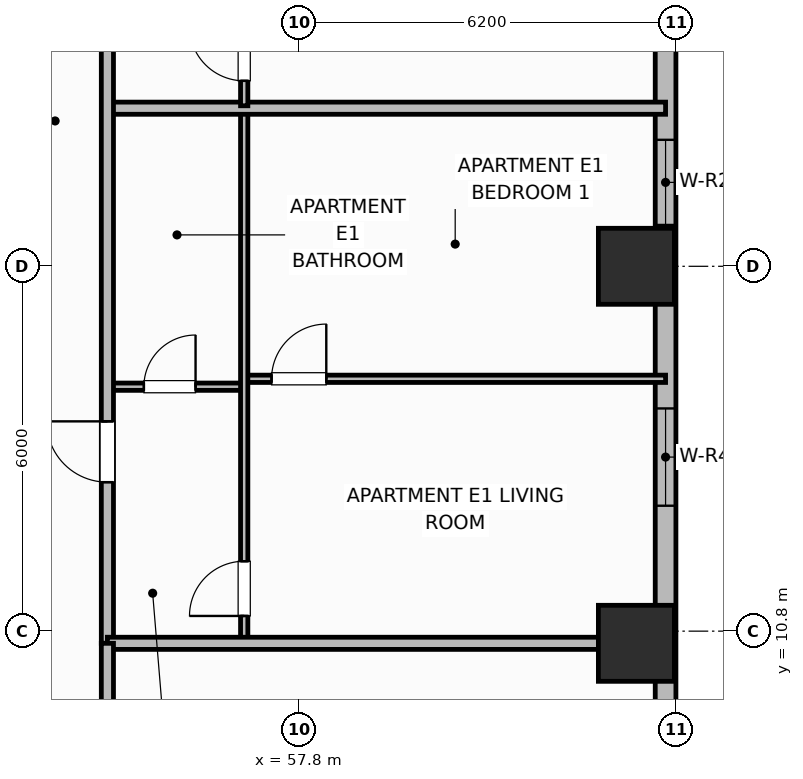
"""IFC4 building model, lengths in metres.
Left out: names, types, materials, properties, quantities, classifications, styles, units other than length and angle.
Written with IfcOpenShell. Run it as: python <this file> out.ifc"""

import sys

from ifc_helpers import new_model, si_unit, direction, frame, frame_2d, origin, origin_2d, place, context, subcontext, project, spatial, rectangle, extrude, element, fill, save


model = new_model("IFC4")
c1 = context("Model", 3, precision=1e-05, world=origin(), true_north=direction((0.0, 1.0)))
c2 = subcontext(c1, "Body", "Model", "MODEL_VIEW")
j1 = project(units=[si_unit("LENGTHUNIT", "METRE"), si_unit("PLANEANGLEUNIT", "RADIAN")], contexts=[c1])
p1 = place(None, origin())
s1 = spatial("IfcSite", under=j1, at=p1, CompositionType="ELEMENT")
p2 = place(p1, origin())
s2 = spatial("IfcBuilding", under=s1, at=p2, CompositionType="ELEMENT")
p3 = place(p2, frame((0.0, 0.0, 62.1)))
s3 = spatial("IfcBuildingStorey", under=s2, at=p3, CompositionType="ELEMENT", Elevation=62.1)
for number, where, z_axis, x_axis in (
    (1, (63.35, 10.6, 0.0), (0.0, 0.0, 1.0), (1.0, 0.0, 0.0)),
    (2, (63.35, 16.8, 0.0), (0.0, 0.0, 1.0), (1.0, 0.0, 0.0)),
):
    element("IfcColumn", number, at=place(p3, frame(where, z_axis=z_axis, x_axis=x_axis)), inside=s3, PredefinedType="COLUMN", context=c2, shape_type="SweptSolid", body=[
        extrude(rectangle(XDim=1.25, YDim=1.25, at=origin_2d()), origin(), (0.0, 0.0, 1.0), 3.7),
    ])
p4 = place(p3, frame((63.83, 9.0, 0.0), z_axis=(0.0, 0.0, 1.0), x_axis=(0.0, 1.0, 0.0)))
e3 = element("IfcWall", 3, at=p4, inside=s3, PredefinedType="SOLIDWALL", context=c2, shape_type="SweptSolid", body=[
    extrude(rectangle(XDim=14.8, YDim=0.34, at=frame_2d((7.4, 0.0))), origin(), (0.0, 0.0, 1.0), 2.7),
])
p5 = place(p4, frame((3.863, 0.0, 0.68)))
e4 = element("IfcOpeningElement", 4, at=p5, cuts=e3, PredefinedType="OPENING", context=c2, shape_type="SweptSolid", body=[
    extrude(rectangle(XDim=1.6, YDim=1.9, at=frame_2d((0.8, 0.95))), frame((0.0, 0.18, 0.0), z_axis=(0.0, -1.0, 0.0), x_axis=(1.0, 0.0, 0.0)), (0.0, 0.0, 1.0), 0.36),
])
p6 = place(p4, frame((8.48, 0.0, 0.69)))
e5 = element("IfcOpeningElement", 5, at=p6, cuts=e3, PredefinedType="OPENING", context=c2, shape_type="SweptSolid", body=[
    extrude(rectangle(XDim=1.4, YDim=1.85, at=frame_2d((0.7, 0.925))), frame((0.0, 0.18, 0.0), z_axis=(0.0, -1.0, 0.0), x_axis=(1.0, 0.0, 0.0)), (0.0, 0.0, 1.0), 0.36),
])
p7 = place(p4, frame((11.663, 0.0, 0.68)))
e6 = element("IfcOpeningElement", 6, at=p7, cuts=e3, PredefinedType="OPENING", context=c2, shape_type="SweptSolid", body=[
    extrude(rectangle(XDim=1.6, YDim=1.9, at=frame_2d((0.8, 0.95))), frame((0.0, 0.18, 0.0), z_axis=(0.0, -1.0, 0.0), x_axis=(1.0, 0.0, 0.0)), (0.0, 0.0, 1.0), 0.36),
])
p8 = place(p3, frame((54.65, 14.82, 0.0), z_axis=(0.0, 0.0, 1.0), x_axis=(1.0, 0.0, 0.0)))
e7 = element("IfcWall", 7, at=p8, inside=s3, PredefinedType="PARTITIONING", context=c2, shape_type="SweptSolid", body=[
    extrude(rectangle(XDim=2.25, YDim=0.12, at=frame_2d((1.125, 0.0))), origin(), (0.0, 0.0, 1.0), 2.53),
])
p9 = place(p8, frame((0.6, 0.0, 0.0)))
e8 = element("IfcOpeningElement", 8, at=p9, cuts=e7, PredefinedType="OPENING", context=c2, shape_type="SweptSolid", body=[
    extrude(rectangle(XDim=0.85, YDim=2.1, at=frame_2d((0.425, 1.05))), frame((0.0, 0.07, 0.0), z_axis=(0.0, -1.0, 0.0), x_axis=(1.0, 0.0, 0.0)), (0.0, 0.0, 1.0), 0.14),
])
p10 = place(p3, frame((56.9, 14.95, 0.0), z_axis=(0.0, 0.0, 1.0), x_axis=(1.0, 0.0, 0.0)))
e9 = element("IfcWall", 9, at=p10, inside=s3, PredefinedType="PARTITIONING", context=c2, shape_type="SweptSolid", body=[
    extrude(rectangle(XDim=6.93, YDim=0.12, at=frame_2d((3.465, 0.0))), origin(), (0.0, 0.0, 1.0), 2.53),
])
p11 = place(p10, frame((0.45, 0.0, 0.0)))
e10 = element("IfcOpeningElement", 10, at=p11, cuts=e9, PredefinedType="OPENING", context=c2, shape_type="SweptSolid", body=[
    extrude(rectangle(XDim=0.9, YDim=2.1, at=frame_2d((0.45, 1.05))), frame((0.0, 0.07, 0.0), z_axis=(0.0, -1.0, 0.0), x_axis=(1.0, 0.0, 0.0)), (0.0, 0.0, 1.0), 0.14),
])
p12 = place(p3, frame((56.9, 10.64, 0.0), z_axis=(0.0, 0.0, 1.0), x_axis=(0.0, 1.0, 0.0)))
e11 = element("IfcWall", 11, at=p12, inside=s3, PredefinedType="PARTITIONING", context=c2, shape_type="SweptSolid", body=[
    extrude(rectangle(XDim=8.72, YDim=0.12, at=frame_2d((4.36, 0.0))), origin(), (0.0, 0.0, 1.0), 2.53),
])
p13 = place(p12, frame((0.41, 0.0, 0.0)))
e12 = element("IfcOpeningElement", 12, at=p13, cuts=e11, PredefinedType="OPENING", context=c2, shape_type="SweptSolid", body=[
    extrude(rectangle(XDim=0.9, YDim=2.1, at=frame_2d((0.45, 1.05))), frame((0.0, 0.07, 0.0), z_axis=(0.0, -1.0, 0.0), x_axis=(1.0, 0.0, 0.0)), (0.0, 0.0, 1.0), 0.14),
])
p14 = place(p3, frame((54.65, 19.4, 0.0), z_axis=(0.0, 0.0, 1.0), x_axis=(1.0, 0.0, 0.0)))
e13 = element("IfcWall", 13, at=p14, inside=s3, PredefinedType="PARTITIONING", context=c2, shape_type="SweptSolid", body=[
    extrude(rectangle(XDim=9.18, YDim=0.2, at=frame_2d((4.59, 0.0))), origin(), (0.0, 0.0, 1.0), 2.53),
])
p15 = place(p3, frame((56.9, 19.44, 0.0), z_axis=(0.0, 0.0, 1.0), x_axis=(0.0, 1.0, 0.0)))
e14 = element("IfcWall", 14, at=p15, inside=s3, PredefinedType="PARTITIONING", context=c2, shape_type="SweptSolid", body=[
    extrude(rectangle(XDim=7.12, YDim=0.12, at=frame_2d((3.56, 0.0))), origin(), (0.0, 0.0, 1.0), 2.53),
])
p16 = place(p15, frame((0.41, 0.0, 0.0)))
e15 = element("IfcOpeningElement", 15, at=p16, cuts=e14, PredefinedType="OPENING", context=c2, shape_type="SweptSolid", body=[
    extrude(rectangle(XDim=0.9, YDim=2.1, at=frame_2d((0.45, 1.05))), frame((0.0, 0.07, 0.0), z_axis=(0.0, -1.0, 0.0), x_axis=(1.0, 0.0, 0.0)), (0.0, 0.0, 1.0), 0.14),
])
p17 = place(p3, frame((54.65, 10.6, 0.0), z_axis=(0.0, 0.0, 1.0), x_axis=(0.0, 1.0, 0.0)))
e16 = element("IfcWall", 16, at=p17, inside=s3, PredefinedType="PARTITIONING", context=c2, shape_type="SweptSolid", body=[
    extrude(rectangle(XDim=35.2, YDim=0.2, at=frame_2d((17.6, 0.0))), origin(), (0.0, 0.0, 1.0), 2.53),
])
p18 = place(p17, frame((2.65, 0.0, 0.0)))
e17 = element("IfcOpeningElement", 17, at=p18, cuts=e16, PredefinedType="OPENING", context=c2, shape_type="SweptSolid", body=[
    extrude(rectangle(XDim=1.0, YDim=2.15, at=frame_2d((0.5, 1.075))), frame((0.0, 0.11, 0.0), z_axis=(0.0, -1.0, 0.0), x_axis=(1.0, 0.0, 0.0)), (0.0, 0.0, 1.0), 0.22),
])
p19 = place(p17, frame((10.81, 0.0, 0.0)))
e18 = element("IfcOpeningElement", 18, at=p19, cuts=e16, PredefinedType="OPENING", context=c2, shape_type="SweptSolid", body=[
    extrude(rectangle(XDim=1.0, YDim=2.15, at=frame_2d((0.5, 1.075))), frame((0.0, 0.11, 0.0), z_axis=(0.0, -1.0, 0.0), x_axis=(1.0, 0.0, 0.0)), (0.0, 0.0, 1.0), 0.22),
])
p20 = place(p17, frame((19.54, 0.0, 0.0)))
e19 = element("IfcOpeningElement", 19, at=p20, cuts=e16, PredefinedType="OPENING", context=c2, shape_type="SweptSolid", body=[
    extrude(rectangle(XDim=1.0, YDim=2.15, at=frame_2d((0.5, 1.075))), frame((0.0, 0.11, 0.0), z_axis=(0.0, -1.0, 0.0), x_axis=(1.0, 0.0, 0.0)), (0.0, 0.0, 1.0), 0.22),
])
p21 = place(p17, frame((26.95, 0.0, 0.0)))
e20 = element("IfcOpeningElement", 20, at=p21, cuts=e16, PredefinedType="OPENING", context=c2, shape_type="SweptSolid", body=[
    extrude(rectangle(XDim=1.0, YDim=2.15, at=frame_2d((0.5, 1.075))), frame((0.0, 0.11, 0.0), z_axis=(0.0, -1.0, 0.0), x_axis=(1.0, 0.0, 0.0)), (0.0, 0.0, 1.0), 0.22),
])
p22 = place(p3, frame((54.65, 10.6, 0.0), z_axis=(0.0, 0.0, 1.0), x_axis=(1.0, 0.0, 0.0)))
e21 = element("IfcWall", 21, at=p22, inside=s3, PredefinedType="PARTITIONING", context=c2, shape_type="SweptSolid", body=[
    extrude(rectangle(XDim=8.76, YDim=0.2, at=frame_2d((4.38, 0.0))), origin(), (0.0, 0.0, 1.0), 2.53),
])
p23 = place(p3, frame((54.65, 4.97, 0.0), z_axis=(0.0, 0.0, 1.0), x_axis=(0.0, 1.0, 0.0)))
e22 = element("IfcWall", 22, at=p23, inside=s3, PredefinedType="PARTITIONING", context=c2, shape_type="SweptSolid", body=[
    extrude(rectangle(XDim=5.63, YDim=0.2, at=frame_2d((2.815, 0.0))), origin(), (0.0, 0.0, 1.0), 2.53),
])
p24 = place(p5, origin())
e23 = element("IfcWindow", 23, at=p24, inside=s3, PartitioningType="SINGLE_PANEL", PredefinedType="WINDOW", context=c2, shape_type="SweptSolid", body=[
    extrude(rectangle(XDim=1.6, YDim=1.9, at=frame_2d((0.8, 0.95))), frame((0.0, 0.03, 0.0), z_axis=(0.0, -1.0, 0.0), x_axis=(1.0, 0.0, 0.0)), (0.0, 0.0, 1.0), 0.06),
])
fill(e4, e23)
p25 = place(p6, origin())
e24 = element("IfcWindow", 24, at=p25, inside=s3, PartitioningType="SINGLE_PANEL", PredefinedType="WINDOW", context=c2, shape_type="SweptSolid", body=[
    extrude(rectangle(XDim=1.4, YDim=1.85, at=frame_2d((0.7, 0.925))), frame((0.0, 0.03, 0.0), z_axis=(0.0, -1.0, 0.0), x_axis=(1.0, 0.0, 0.0)), (0.0, 0.0, 1.0), 0.06),
])
fill(e5, e24)
p26 = place(p9, origin())
e25 = element("IfcDoor", 25, at=p26, inside=s3, OperationType="SINGLE_SWING_RIGHT", PredefinedType="DOOR", context=c2, shape_type="SweptSolid", body=[
    extrude(rectangle(XDim=0.85, YDim=2.1, at=frame_2d((0.425, 1.05))), frame((0.0, 0.025, 0.0), z_axis=(0.0, -1.0, 0.0), x_axis=(1.0, 0.0, 0.0)), (0.0, 0.0, 1.0), 0.05),
])
fill(e8, e25)
p27 = place(p11, origin())
e26 = element("IfcDoor", 26, at=p27, inside=s3, OperationType="SINGLE_SWING_RIGHT", PredefinedType="DOOR", context=c2, shape_type="SweptSolid", body=[
    extrude(rectangle(XDim=0.9, YDim=2.1, at=frame_2d((0.45, 1.05))), frame((0.0, 0.025, 0.0), z_axis=(0.0, -1.0, 0.0), x_axis=(1.0, 0.0, 0.0)), (0.0, 0.0, 1.0), 0.05),
])
fill(e10, e26)
p28 = place(p13, origin())
e27 = element("IfcDoor", 27, at=p28, inside=s3, OperationType="SINGLE_SWING_LEFT", PredefinedType="DOOR", context=c2, shape_type="SweptSolid", body=[
    extrude(rectangle(XDim=0.9, YDim=2.1, at=frame_2d((0.45, 1.05))), frame((0.0, 0.025, 0.0), z_axis=(0.0, -1.0, 0.0), x_axis=(1.0, 0.0, 0.0)), (0.0, 0.0, 1.0), 0.05),
])
fill(e12, e27)
p29 = place(p16, origin())
e28 = element("IfcDoor", 28, at=p29, inside=s3, OperationType="SINGLE_SWING_RIGHT", PredefinedType="DOOR", context=c2, shape_type="SweptSolid", body=[
    extrude(rectangle(XDim=0.9, YDim=2.1, at=frame_2d((0.45, 1.05))), frame((0.0, 0.025, 0.0), z_axis=(0.0, -1.0, 0.0), x_axis=(1.0, 0.0, 0.0)), (0.0, 0.0, 1.0), 0.05),
])
fill(e15, e28)
p30 = place(p18, origin())
e29 = element("IfcDoor", 29, at=p30, inside=s3, OperationType="SINGLE_SWING_RIGHT", PredefinedType="DOOR", context=c2, shape_type="SweptSolid", body=[
    extrude(rectangle(XDim=1.0, YDim=2.15, at=frame_2d((0.5, 1.075))), frame((0.0, 0.025, 0.0), z_axis=(0.0, -1.0, 0.0), x_axis=(1.0, 0.0, 0.0)), (0.0, 0.0, 1.0), 0.05),
])
fill(e17, e29)
save(model, sys.argv[1])
